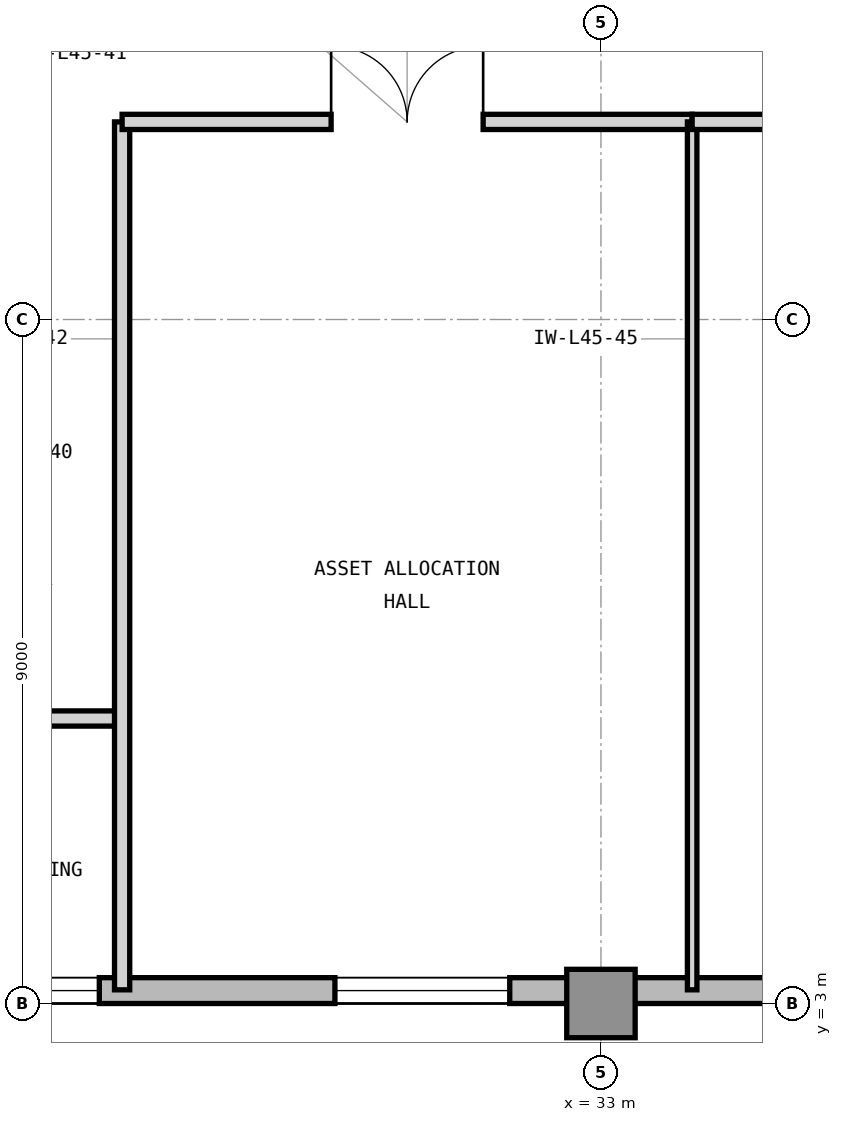
"""IFC4 building model, lengths in metres.
Left out: names, types, materials, properties, quantities, classifications, styles, units other than length and angle.
Written with IfcOpenShell. Run it as: python <this file> out.ifc"""

import sys

from ifc_helpers import new_model, si_unit, direction, frame, frame_2d, origin, origin_2d, place, context, subcontext, project, spatial, rectangle, extrude, element, fill, save


model = new_model("IFC4")
c1 = context("Model", 3, precision=1e-05, world=origin(), true_north=direction((0.0, 1.0)))
c2 = subcontext(c1, "Body", "Model", "MODEL_VIEW")
j1 = project(units=[si_unit("LENGTHUNIT", "METRE"), si_unit("PLANEANGLEUNIT", "RADIAN")], contexts=[c1])
p1 = place(None, origin())
s1 = spatial("IfcSite", under=j1, at=p1, CompositionType="ELEMENT")
p2 = place(p1, origin())
s2 = spatial("IfcBuilding", under=s1, at=p2, CompositionType="ELEMENT")
p3 = place(p2, frame((0.0, 0.0, 187.8)))
s3 = spatial("IfcBuildingStorey", under=s2, at=p3, CompositionType="ELEMENT", Elevation=187.8)
p4 = place(p3, frame((33.0, 3.0, 0.0), z_axis=(0.0, 0.0, 1.0), x_axis=(1.0, 0.0, 0.0)))
e1 = element("IfcColumn", 1, at=p4, inside=s3, PredefinedType="COLUMN", context=c2, shape_type="SweptSolid", body=[
    extrude(rectangle(XDim=0.9, YDim=0.9, at=origin_2d()), origin(), (0.0, 0.0, 1.0), 3.9),
])
p5 = place(p3, frame((23.9, 3.17, 0.0), z_axis=(0.0, 0.0, 1.0), x_axis=(1.0, 0.0, 0.0)))
e2 = element("IfcWall", 2, at=p5, inside=s3, PredefinedType="STANDARD", context=c2, shape_type="SweptSolid", body=[
    extrude(rectangle(XDim=31.5, YDim=0.34, at=frame_2d((15.75, 0.0))), origin(), (0.0, 0.0, 1.0), 3.7),
])
p6 = place(p5, frame((5.6, 0.0, 0.9)))
e3 = element("IfcOpeningElement", 3, at=p6, cuts=e2, PredefinedType="OPENING", context=c2, shape_type="SweptSolid", body=[
    extrude(rectangle(XDim=2.3, YDim=2.2, at=frame_2d((1.15, 1.1))), frame((0.0, 0.18, 0.0), z_axis=(0.0, -1.0, 0.0), x_axis=(1.0, 0.0, 0.0)), (0.0, 0.0, 1.0), 0.36),
])
p7 = place(p5, frame((14.6, 0.0, 0.9)))
e4 = element("IfcOpeningElement", 4, at=p7, cuts=e2, PredefinedType="OPENING", context=c2, shape_type="SweptSolid", body=[
    extrude(rectangle(XDim=2.3, YDim=2.2, at=frame_2d((1.15, 1.1))), frame((0.0, 0.18, 0.0), z_axis=(0.0, -1.0, 0.0), x_axis=(1.0, 0.0, 0.0)), (0.0, 0.0, 1.0), 0.36),
])
p8 = place(p5, frame((19.1, 0.0, 0.9)))
e5 = element("IfcOpeningElement", 5, at=p8, cuts=e2, PredefinedType="OPENING", context=c2, shape_type="SweptSolid", body=[
    extrude(rectangle(XDim=2.3, YDim=2.2, at=frame_2d((1.15, 1.1))), frame((0.0, 0.18, 0.0), z_axis=(0.0, -1.0, 0.0), x_axis=(1.0, 0.0, 0.0)), (0.0, 0.0, 1.0), 0.36),
])
p9 = place(p5, frame((0.9, 0.0, 0.9)))
e6 = element("IfcOpeningElement", 6, at=p9, cuts=e2, PredefinedType="OPENING", context=c2, shape_type="SweptSolid", body=[
    extrude(rectangle(XDim=1.6, YDim=2.2, at=frame_2d((0.8, 1.1))), frame((0.0, 0.18, 0.0), z_axis=(0.0, -1.0, 0.0), x_axis=(1.0, 0.0, 0.0)), (0.0, 0.0, 1.0), 0.36),
])
p10 = place(p3, frame((23.85, 6.75, 0.0), z_axis=(0.0, 0.0, 1.0), x_axis=(1.0, 0.0, 0.0)))
e7 = element("IfcWall", 7, at=p10, inside=s3, PredefinedType="PARTITIONING", context=c2, shape_type="SweptSolid", body=[
    extrude(rectangle(XDim=2.85, YDim=0.2, at=frame_2d((1.425, 0.0))), origin(), (0.0, 0.0, 1.0), 3.69),
])
p11 = place(p10, frame((0.7, 0.0, 0.0)))
e8 = element("IfcOpeningElement", 8, at=p11, cuts=e7, PredefinedType="OPENING", context=c2, shape_type="SweptSolid", body=[
    extrude(rectangle(XDim=1.0, YDim=2.15, at=frame_2d((0.5, 1.075))), frame((0.0, 0.11, 0.0), z_axis=(0.0, -1.0, 0.0), x_axis=(1.0, 0.0, 0.0)), (0.0, 0.0, 1.0), 0.22),
])
p12 = place(p3, frame((26.7, 3.18, 0.0), z_axis=(0.0, 0.0, 1.0), x_axis=(0.0, 1.0, 0.0)))
e9 = element("IfcWall", 9, at=p12, inside=s3, PredefinedType="PARTITIONING", context=c2, shape_type="SweptSolid", body=[
    extrude(rectangle(XDim=11.42, YDim=0.2, at=frame_2d((5.71, 0.0))), origin(), (0.0, 0.0, 1.0), 3.69),
])
p13 = place(p3, frame((26.7, 14.6, 0.0), z_axis=(0.0, 0.0, 1.0), x_axis=(1.0, 0.0, 0.0)))
e10 = element("IfcWall", 10, at=p13, inside=s3, PredefinedType="PARTITIONING", context=c2, shape_type="SweptSolid", body=[
    extrude(rectangle(XDim=7.5, YDim=0.2, at=frame_2d((3.75, 0.0))), origin(), (0.0, 0.0, 1.0), 3.69),
])
p14 = place(p13, frame((2.75, 0.0, 0.0)))
e11 = element("IfcOpeningElement", 11, at=p14, cuts=e10, PredefinedType="OPENING", context=c2, shape_type="SweptSolid", body=[
    extrude(rectangle(XDim=2.0, YDim=2.5, at=frame_2d((1.0, 1.25))), frame((0.0, 0.11, 0.0), z_axis=(0.0, -1.0, 0.0), x_axis=(1.0, 0.0, 0.0)), (0.0, 0.0, 1.0), 0.22),
])
p15 = place(p3, frame((34.2, 3.18, 0.0), z_axis=(0.0, 0.0, 1.0), x_axis=(0.0, 1.0, 0.0)))
e12 = element("IfcWall", 12, at=p15, inside=s3, PredefinedType="PARTITIONING", context=c2, shape_type="SweptSolid", body=[
    extrude(rectangle(XDim=11.42, YDim=0.125, at=frame_2d((5.71, 0.0))), origin(), (0.0, 0.0, 1.0), 3.69),
])
p16 = place(p3, frame((34.2, 14.6, 0.0), z_axis=(0.0, 0.0, 1.0), x_axis=(1.0, 0.0, 0.0)))
e13 = element("IfcWall", 13, at=p16, inside=s3, PredefinedType="PARTITIONING", context=c2, shape_type="SweptSolid", body=[
    extrude(rectangle(XDim=7.5, YDim=0.2, at=frame_2d((3.75, 0.0))), origin(), (0.0, 0.0, 1.0), 3.69),
])
p17 = place(p16, frame((3.25, 0.0, 0.0)))
e14 = element("IfcOpeningElement", 14, at=p17, cuts=e13, PredefinedType="OPENING", context=c2, shape_type="SweptSolid", body=[
    extrude(rectangle(XDim=1.0, YDim=2.15, at=frame_2d((0.5, 1.075))), frame((0.0, 0.11, 0.0), z_axis=(0.0, -1.0, 0.0), x_axis=(1.0, 0.0, 0.0)), (0.0, 0.0, 1.0), 0.22),
])
p18 = place(p6, origin())
e15 = element("IfcWindow", 15, at=p18, inside=s3, PartitioningType="SINGLE_PANEL", PredefinedType="WINDOW", context=c2, shape_type="SweptSolid", body=[
    extrude(rectangle(XDim=2.3, YDim=2.2, at=frame_2d((1.15, 1.1))), frame((0.0, 0.11, 0.0), z_axis=(0.0, -1.0, 0.0), x_axis=(1.0, 0.0, 0.0)), (0.0, 0.0, 1.0), 0.06),
])
fill(e3, e15)
p19 = place(p14, origin())
e16 = element("IfcDoor", 16, at=p19, inside=s3, OperationType="DOUBLE_DOOR_SINGLE_SWING", PredefinedType="DOOR", context=c2, shape_type="SweptSolid", body=[
    extrude(rectangle(XDim=2.0, YDim=2.5, at=frame_2d((1.0, 1.25))), frame((0.0, 0.025, 0.0), z_axis=(0.0, -1.0, 0.0), x_axis=(1.0, 0.0, 0.0)), (0.0, 0.0, 1.0), 0.05),
])
fill(e11, e16)
p20 = place(p9, origin())
e17 = element("IfcWindow", 17, at=p20, inside=s3, PartitioningType="SINGLE_PANEL", PredefinedType="WINDOW", context=c2, shape_type="SweptSolid", body=[
    extrude(rectangle(XDim=1.6, YDim=2.2, at=frame_2d((0.8, 1.1))), frame((0.0, 0.11, 0.0), z_axis=(0.0, -1.0, 0.0), x_axis=(1.0, 0.0, 0.0)), (0.0, 0.0, 1.0), 0.06),
])
fill(e6, e17)
save(model, sys.argv[1])
